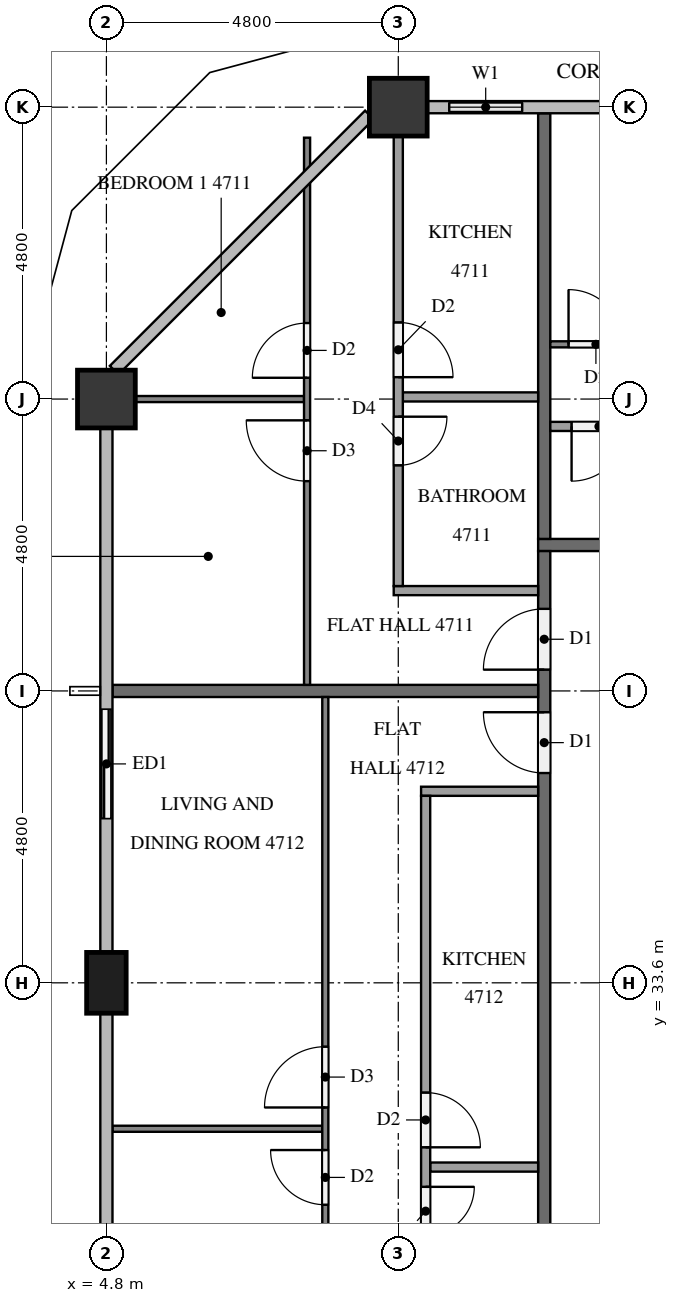
"""IFC4 building model, lengths in metres.
Left out: names, types, materials, properties, quantities, classifications, styles, units other than length and angle.
Written with IfcOpenShell. Run it as: python <this file> out.ifc"""

import sys

from ifc_helpers import new_model, si_unit, direction, frame, frame_2d, origin, origin_2d, place, context, subcontext, project, spatial, rectangle, extrude, element, fill, save


model = new_model("IFC4")
c1 = context("Model", 3, precision=1e-05, world=origin(), true_north=direction((0.0, 1.0)))
c2 = subcontext(c1, "Body", "Model", "MODEL_VIEW")
j1 = project(units=[si_unit("LENGTHUNIT", "METRE"), si_unit("PLANEANGLEUNIT", "RADIAN")], contexts=[c1])
p1 = place(None, origin())
s1 = spatial("IfcSite", under=j1, at=p1, CompositionType="ELEMENT")
p2 = place(p1, origin())
s2 = spatial("IfcBuilding", under=s1, at=p2, CompositionType="ELEMENT")
p3 = place(p2, frame((0.0, 0.0, 182.4)))
s3 = spatial("IfcBuildingStorey", under=s2, at=p3, CompositionType="ELEMENT", Elevation=182.4)
for number, where, z_axis, x_axis in (
    (1, (9.6, 48.0, 0.0), (0.0, 0.0, 1.0), (1.0, 0.0, 0.0)),
    (2, (4.8, 43.2, 0.0), (0.0, 0.0, 1.0), (1.0, 0.0, 0.0)),
):
    element("IfcColumn", number, at=place(p3, frame(where, z_axis=z_axis, x_axis=x_axis)), inside=s3, PredefinedType="COLUMN", context=c2, shape_type="SweptSolid", body=[
        extrude(rectangle(XDim=0.95, YDim=0.95, at=origin_2d()), origin(), (0.0, 0.0, 1.0), 3.2),
    ])
p4 = place(p3, frame((4.8, 33.6, 0.0), z_axis=(0.0, 0.0, 1.0), x_axis=(0.0, 1.0, 0.0)))
e3 = element("IfcColumn", 3, at=p4, inside=s3, PredefinedType="COLUMN", context=c2, shape_type="SweptSolid", body=[
    extrude(rectangle(XDim=1.0, YDim=0.65, at=origin_2d()), origin(), (0.0, 0.0, 1.0), 3.2),
])
p5 = place(p3, frame((12.0, 48.0, 0.0), z_axis=(0.0, 0.0, 1.0), x_axis=(-1.0, 0.0, 0.0)))
e4 = element("IfcWall", 4, at=p5, inside=s3, PredefinedType="SOLIDWALL", context=c2, shape_type="SweptSolid", body=[
    extrude(rectangle(XDim=1.925, YDim=0.15, at=frame_2d((0.962, 0.0))), origin(), (0.0, 0.0, 1.0), 3.2),
])
p6 = place(p5, frame((0.363, 0.0, 0.9)))
e5 = element("IfcOpeningElement", 5, at=p6, cuts=e4, PredefinedType="OPENING", context=c2, shape_type="SweptSolid", body=[
    extrude(rectangle(XDim=1.2, YDim=1.4, at=frame_2d((0.6, 0.7))), frame((0.0, 0.085, 0.0), z_axis=(0.0, -1.0, 0.0), x_axis=(1.0, 0.0, 0.0)), (0.0, 0.0, 1.0), 0.17),
])
p7 = place(p3, frame((4.8, 38.4, 0.0), z_axis=(0.0, 0.0, 1.0), x_axis=(0.0, -1.0, 0.0)))
e6 = element("IfcWall", 6, at=p7, inside=s3, PredefinedType="SOLIDWALL", context=c2, shape_type="SweptSolid", body=[
    extrude(rectangle(XDim=2.4, YDim=0.15, at=frame_2d((1.2, 0.0))), origin(), (0.0, 0.0, 1.0), 3.2),
])
p8 = place(p7, frame((0.3, 0.0, 0.0)))
e7 = element("IfcOpeningElement", 7, at=p8, cuts=e6, PredefinedType="OPENING", context=c2, shape_type="SweptSolid", body=[
    extrude(rectangle(XDim=1.8, YDim=2.4, at=frame_2d((0.9, 1.2))), frame((0.0, 0.085, 0.0), z_axis=(0.0, -1.0, 0.0), x_axis=(1.0, 0.0, 0.0)), (0.0, 0.0, 1.0), 0.17),
])
p9 = place(p3, frame((11.9, 40.8, 0.0), z_axis=(0.0, 0.0, 1.0), x_axis=(1.0, 0.0, 0.0)))
e8 = element("IfcWall", 8, at=p9, inside=s3, PredefinedType="PARTITIONING", context=c2, shape_type="SweptSolid", body=[
    extrude(rectangle(XDim=38.6, YDim=0.2, at=frame_2d((19.3, 0.0))), origin(), (0.0, 0.0, 1.0), 3.2),
])
p10 = place(p9, frame((37.15, 0.0, 0.0)))
e9 = element("IfcOpeningElement", 9, at=p10, cuts=e8, PredefinedType="OPENING", context=c2, shape_type="SweptSolid", body=[
    extrude(rectangle(XDim=1.0, YDim=2.1, at=frame_2d((0.5, 1.05))), frame((0.0, 0.11, 0.0), z_axis=(0.0, -1.0, 0.0), x_axis=(1.0, 0.0, 0.0)), (0.0, 0.0, 1.0), 0.22),
])
p11 = place(p9, frame((20.35, 0.0, 0.0)))
e10 = element("IfcOpeningElement", 10, at=p11, cuts=e8, PredefinedType="OPENING", context=c2, shape_type="SweptSolid", body=[
    extrude(rectangle(XDim=1.0, YDim=2.1, at=frame_2d((0.5, 1.05))), frame((0.0, 0.11, 0.0), z_axis=(0.0, -1.0, 0.0), x_axis=(1.0, 0.0, 0.0)), (0.0, 0.0, 1.0), 0.22),
])
p12 = place(p9, frame((13.15, 0.0, 0.0)))
e11 = element("IfcOpeningElement", 11, at=p12, cuts=e8, PredefinedType="OPENING", context=c2, shape_type="SweptSolid", body=[
    extrude(rectangle(XDim=1.0, YDim=2.1, at=frame_2d((0.5, 1.05))), frame((0.0, 0.11, 0.0), z_axis=(0.0, -1.0, 0.0), x_axis=(1.0, 0.0, 0.0)), (0.0, 0.0, 1.0), 0.22),
])
p13 = place(p3, frame((12.0, 12.1, 0.0), z_axis=(0.0, 0.0, 1.0), x_axis=(0.0, 1.0, 0.0)))
e12 = element("IfcWall", 12, at=p13, inside=s3, PredefinedType="PARTITIONING", context=c2, shape_type="SweptSolid", body=[
    extrude(rectangle(XDim=28.6, YDim=0.2, at=frame_2d((14.3, 0.0))), origin(), (0.0, 0.0, 1.0), 3.2),
])
p14 = place(p13, frame((26.65, 0.0, 0.0)))
e13 = element("IfcOpeningElement", 13, at=p14, cuts=e12, PredefinedType="OPENING", context=c2, shape_type="SweptSolid", body=[
    extrude(rectangle(XDim=1.0, YDim=2.1, at=frame_2d((0.5, 1.05))), frame((0.0, 0.11, 0.0), z_axis=(0.0, -1.0, 0.0), x_axis=(1.0, 0.0, 0.0)), (0.0, 0.0, 1.0), 0.22),
])
p15 = place(p13, frame((24.95, 0.0, 0.0)))
e14 = element("IfcOpeningElement", 14, at=p15, cuts=e12, PredefinedType="OPENING", context=c2, shape_type="SweptSolid", body=[
    extrude(rectangle(XDim=1.0, YDim=2.1, at=frame_2d((0.5, 1.05))), frame((0.0, 0.11, 0.0), z_axis=(0.0, -1.0, 0.0), x_axis=(1.0, 0.0, 0.0)), (0.0, 0.0, 1.0), 0.22),
])
p16 = place(p13, frame((12.95, 0.0, 0.0)))
e15 = element("IfcOpeningElement", 15, at=p16, cuts=e12, PredefinedType="OPENING", context=c2, shape_type="SweptSolid", body=[
    extrude(rectangle(XDim=1.0, YDim=2.1, at=frame_2d((0.5, 1.05))), frame((0.0, 0.11, 0.0), z_axis=(0.0, -1.0, 0.0), x_axis=(1.0, 0.0, 0.0)), (0.0, 0.0, 1.0), 0.22),
])
for number, where, z_axis, x_axis in (
    (16, (12.0, 47.9, 0.0), (0.0, 0.0, 1.0), (0.0, -1.0, 0.0)),
    (17, (4.9, 38.4, 0.0), (0.0, 0.0, 1.0), (1.0, 0.0, 0.0)),
):
    element("IfcWall", number, at=place(p3, frame(where, z_axis=z_axis, x_axis=x_axis)), inside=s3, PredefinedType="PARTITIONING", context=c2, shape_type="SweptSolid", body=[
        extrude(rectangle(XDim=7.0, YDim=0.2, at=frame_2d((3.5, 0.0))), origin(), (0.0, 0.0, 1.0), 3.2),
    ])
p17 = place(p3, frame((12.1, 44.1, 0.0), z_axis=(0.0, 0.0, 1.0), x_axis=(1.0, 0.0, 0.0)))
e18 = element("IfcWall", 18, at=p17, inside=s3, PredefinedType="PARTITIONING", context=c2, shape_type="SweptSolid", body=[
    extrude(rectangle(XDim=14.2, YDim=0.1, at=frame_2d((7.1, 0.0))), origin(), (0.0, 0.0, 1.0), 3.2),
])
p18 = place(p17, frame((9.85, 0.0, 0.0)))
e19 = element("IfcOpeningElement", 19, at=p18, cuts=e18, PredefinedType="OPENING", context=c2, shape_type="SweptSolid", body=[
    extrude(rectangle(XDim=0.9, YDim=2.1, at=frame_2d((0.45, 1.05))), frame((0.0, 0.06, 0.0), z_axis=(0.0, -1.0, 0.0), x_axis=(1.0, 0.0, 0.0)), (0.0, 0.0, 1.0), 0.12),
])
p19 = place(p17, frame((8.15, 0.0, 0.0)))
e20 = element("IfcOpeningElement", 20, at=p19, cuts=e18, PredefinedType="OPENING", context=c2, shape_type="SweptSolid", body=[
    extrude(rectangle(XDim=1.0, YDim=2.1, at=frame_2d((0.5, 1.05))), frame((0.0, 0.06, 0.0), z_axis=(0.0, -1.0, 0.0), x_axis=(1.0, 0.0, 0.0)), (0.0, 0.0, 1.0), 0.12),
])
p20 = place(p17, frame((0.3, 0.0, 0.0)))
e21 = element("IfcOpeningElement", 21, at=p20, cuts=e18, PredefinedType="OPENING", context=c2, shape_type="SweptSolid", body=[
    extrude(rectangle(XDim=0.9, YDim=2.1, at=frame_2d((0.45, 1.05))), frame((0.0, 0.06, 0.0), z_axis=(0.0, -1.0, 0.0), x_axis=(1.0, 0.0, 0.0)), (0.0, 0.0, 1.0), 0.12),
])
p21 = place(p3, frame((24.675, 42.75, 0.0), z_axis=(0.0, 0.0, 1.0), x_axis=(-1.0, 0.0, 0.0)))
e22 = element("IfcWall", 22, at=p21, inside=s3, PredefinedType="PARTITIONING", context=c2, shape_type="SweptSolid", body=[
    extrude(rectangle(XDim=12.575, YDim=0.15, at=frame_2d((6.288, 0.0))), origin(), (0.0, 0.0, 1.0), 3.2),
])
p22 = place(p21, frame((1.777, 0.0, 0.0)))
e23 = element("IfcOpeningElement", 23, at=p22, cuts=e22, PredefinedType="OPENING", context=c2, shape_type="SweptSolid", body=[
    extrude(rectangle(XDim=0.8, YDim=2.1, at=frame_2d((0.4, 1.05))), frame((0.0, 0.085, 0.0), z_axis=(0.0, -1.0, 0.0), x_axis=(1.0, 0.0, 0.0)), (0.0, 0.0, 1.0), 0.17),
])
p23 = place(p21, frame((3.227, 0.0, 0.0)))
e24 = element("IfcOpeningElement", 24, at=p23, cuts=e22, PredefinedType="OPENING", context=c2, shape_type="SweptSolid", body=[
    extrude(rectangle(XDim=0.9, YDim=2.1, at=frame_2d((0.45, 1.05))), frame((0.0, 0.085, 0.0), z_axis=(0.0, -1.0, 0.0), x_axis=(1.0, 0.0, 0.0)), (0.0, 0.0, 1.0), 0.17),
])
p24 = place(p21, frame((11.325, 0.0, 0.0)))
e25 = element("IfcOpeningElement", 25, at=p24, cuts=e22, PredefinedType="OPENING", context=c2, shape_type="SweptSolid", body=[
    extrude(rectangle(XDim=0.9, YDim=2.1, at=frame_2d((0.45, 1.05))), frame((0.0, 0.085, 0.0), z_axis=(0.0, -1.0, 0.0), x_axis=(1.0, 0.0, 0.0)), (0.0, 0.0, 1.0), 0.17),
])
p25 = place(p3, frame((8.05, 43.2, 0.0), z_axis=(0.0, 0.0, 1.0), x_axis=(-1.0, 0.0, 0.0)))
e26 = element("IfcWall", 26, at=p25, inside=s3, PredefinedType="PARTITIONING", context=c2, shape_type="SweptSolid", body=[
    extrude(rectangle(XDim=2.775, YDim=0.1, at=frame_2d((1.388, 0.0))), origin(), (0.0, 0.0, 1.0), 3.2),
])
p26 = place(p3, frame((8.1, 38.5, 0.0), z_axis=(0.0, 0.0, 1.0), x_axis=(0.0, 1.0, 0.0)))
e27 = element("IfcWall", 27, at=p26, inside=s3, PredefinedType="PARTITIONING", context=c2, shape_type="SweptSolid", body=[
    extrude(rectangle(XDim=8.998, YDim=0.1, at=frame_2d((4.499, 0.0))), origin(), (0.0, 0.0, 1.0), 3.2),
])
p27 = place(p26, frame((3.35, 0.0, 0.0)))
e28 = element("IfcOpeningElement", 28, at=p27, cuts=e27, PredefinedType="OPENING", context=c2, shape_type="SweptSolid", body=[
    extrude(rectangle(XDim=1.0, YDim=2.1, at=frame_2d((0.5, 1.05))), frame((0.0, 0.06, 0.0), z_axis=(0.0, -1.0, 0.0), x_axis=(1.0, 0.0, 0.0)), (0.0, 0.0, 1.0), 0.12),
])
p28 = place(p26, frame((5.05, 0.0, 0.0)))
e29 = element("IfcOpeningElement", 29, at=p28, cuts=e27, PredefinedType="OPENING", context=c2, shape_type="SweptSolid", body=[
    extrude(rectangle(XDim=0.9, YDim=2.1, at=frame_2d((0.45, 1.05))), frame((0.0, 0.06, 0.0), z_axis=(0.0, -1.0, 0.0), x_axis=(1.0, 0.0, 0.0)), (0.0, 0.0, 1.0), 0.12),
])
p29 = place(p3, frame((11.9, 43.235, 0.0), z_axis=(0.0, 0.0, 1.0), x_axis=(-1.0, 0.0, 0.0)))
e30 = element("IfcWall", 30, at=p29, inside=s3, PredefinedType="PARTITIONING", context=c2, shape_type="SweptSolid", body=[
    extrude(rectangle(XDim=2.225, YDim=0.15, at=frame_2d((1.112, 0.0))), origin(), (0.0, 0.0, 1.0), 3.2),
])
p30 = place(p3, frame((11.9, 40.05, 0.0), z_axis=(0.0, 0.0, 1.0), x_axis=(-1.0, 0.0, 0.0)))
e31 = element("IfcWall", 31, at=p30, inside=s3, PredefinedType="PARTITIONING", context=c2, shape_type="SweptSolid", body=[
    extrude(rectangle(XDim=2.375, YDim=0.15, at=frame_2d((1.188, 0.0))), origin(), (0.0, 0.0, 1.0), 3.2),
])
p31 = place(p3, frame((9.6, 47.525, 0.0), z_axis=(0.0, 0.0, 1.0), x_axis=(0.0, -1.0, 0.0)))
e32 = element("IfcWall", 32, at=p31, inside=s3, PredefinedType="PARTITIONING", context=c2, shape_type="SweptSolid", body=[
    extrude(rectangle(XDim=7.4, YDim=0.15, at=frame_2d((3.7, 0.0))), origin(), (0.0, 0.0, 1.0), 3.2),
])
p32 = place(p31, frame((4.615, 0.0, 0.0)))
e33 = element("IfcOpeningElement", 33, at=p32, cuts=e32, PredefinedType="OPENING", context=c2, shape_type="SweptSolid", body=[
    extrude(rectangle(XDim=0.8, YDim=2.1, at=frame_2d((0.4, 1.05))), frame((0.0, 0.085, 0.0), z_axis=(0.0, -1.0, 0.0), x_axis=(1.0, 0.0, 0.0)), (0.0, 0.0, 1.0), 0.17),
])
p33 = place(p31, frame((3.065, 0.0, 0.0)))
e34 = element("IfcOpeningElement", 34, at=p33, cuts=e32, PredefinedType="OPENING", context=c2, shape_type="SweptSolid", body=[
    extrude(rectangle(XDim=0.9, YDim=2.1, at=frame_2d((0.45, 1.05))), frame((0.0, 0.085, 0.0), z_axis=(0.0, -1.0, 0.0), x_axis=(1.0, 0.0, 0.0)), (0.0, 0.0, 1.0), 0.17),
])
p34 = place(p3, frame((8.35, 31.2, 0.0), z_axis=(0.0, 0.0, 1.0), x_axis=(-1.0, 0.0, 0.0)))
e35 = element("IfcWall", 35, at=p34, inside=s3, PredefinedType="PARTITIONING", context=c2, shape_type="SweptSolid", body=[
    extrude(rectangle(XDim=3.45, YDim=0.1, at=frame_2d((1.725, 0.0))), origin(), (0.0, 0.0, 1.0), 3.2),
])
p35 = place(p3, frame((8.4, 26.5, 0.0), z_axis=(0.0, 0.0, 1.0), x_axis=(0.0, 1.0, 0.0)))
e36 = element("IfcWall", 36, at=p35, inside=s3, PredefinedType="PARTITIONING", context=c2, shape_type="SweptSolid", body=[
    extrude(rectangle(XDim=11.8, YDim=0.1, at=frame_2d((5.9, 0.0))), origin(), (0.0, 0.0, 1.0), 3.2),
])
p36 = place(p35, frame((5.05, 0.0, 0.0)))
e37 = element("IfcOpeningElement", 37, at=p36, cuts=e36, PredefinedType="OPENING", context=c2, shape_type="SweptSolid", body=[
    extrude(rectangle(XDim=1.0, YDim=2.1, at=frame_2d((0.5, 1.05))), frame((0.0, 0.06, 0.0), z_axis=(0.0, -1.0, 0.0), x_axis=(1.0, 0.0, 0.0)), (0.0, 0.0, 1.0), 0.12),
])
p37 = place(p35, frame((3.45, 0.0, 0.0)))
e38 = element("IfcOpeningElement", 38, at=p37, cuts=e36, PredefinedType="OPENING", context=c2, shape_type="SweptSolid", body=[
    extrude(rectangle(XDim=0.9, YDim=2.1, at=frame_2d((0.45, 1.05))), frame((0.0, 0.06, 0.0), z_axis=(0.0, -1.0, 0.0), x_axis=(1.0, 0.0, 0.0)), (0.0, 0.0, 1.0), 0.12),
])
p38 = place(p3, frame((11.9, 30.57, 0.0), z_axis=(0.0, 0.0, 1.0), x_axis=(-1.0, 0.0, 0.0)))
e39 = element("IfcWall", 39, at=p38, inside=s3, PredefinedType="PARTITIONING", context=c2, shape_type="SweptSolid", body=[
    extrude(rectangle(XDim=1.775, YDim=0.15, at=frame_2d((0.887, 0.0))), origin(), (0.0, 0.0, 1.0), 3.2),
])
p39 = place(p3, frame((11.9, 36.75, 0.0), z_axis=(0.0, 0.0, 1.0), x_axis=(-1.0, 0.0, 0.0)))
e40 = element("IfcWall", 40, at=p39, inside=s3, PredefinedType="PARTITIONING", context=c2, shape_type="SweptSolid", body=[
    extrude(rectangle(XDim=1.925, YDim=0.15, at=frame_2d((0.962, 0.0))), origin(), (0.0, 0.0, 1.0), 3.2),
])
p40 = place(p3, frame((10.05, 36.675, 0.0), z_axis=(0.0, 0.0, 1.0), x_axis=(0.0, -1.0, 0.0)))
e41 = element("IfcWall", 41, at=p40, inside=s3, PredefinedType="PARTITIONING", context=c2, shape_type="SweptSolid", body=[
    extrude(rectangle(XDim=10.175, YDim=0.15, at=frame_2d((5.087, 0.0))), origin(), (0.0, 0.0, 1.0), 3.2),
])
p41 = place(p40, frame((4.88, 0.0, 0.0)))
e42 = element("IfcOpeningElement", 42, at=p41, cuts=e41, PredefinedType="OPENING", context=c2, shape_type="SweptSolid", body=[
    extrude(rectangle(XDim=0.9, YDim=2.1, at=frame_2d((0.45, 1.05))), frame((0.0, 0.085, 0.0), z_axis=(0.0, -1.0, 0.0), x_axis=(1.0, 0.0, 0.0)), (0.0, 0.0, 1.0), 0.17),
])
p42 = place(p40, frame((6.43, 0.0, 0.0)))
e43 = element("IfcOpeningElement", 43, at=p42, cuts=e41, PredefinedType="OPENING", context=c2, shape_type="SweptSolid", body=[
    extrude(rectangle(XDim=0.8, YDim=2.1, at=frame_2d((0.4, 1.05))), frame((0.0, 0.085, 0.0), z_axis=(0.0, -1.0, 0.0), x_axis=(1.0, 0.0, 0.0)), (0.0, 0.0, 1.0), 0.17),
])
p43 = place(p6, origin())
e44 = element("IfcWindow", 44, at=p43, inside=s3, PartitioningType="SINGLE_PANEL", PredefinedType="WINDOW", context=c2, shape_type="SweptSolid", body=[
    extrude(rectangle(XDim=1.2, YDim=1.4, at=frame_2d((0.6, 0.7))), frame((0.0, 0.03, 0.0), z_axis=(0.0, -1.0, 0.0), x_axis=(1.0, 0.0, 0.0)), (0.0, 0.0, 1.0), 0.06),
])
fill(e5, e44)
p44 = place(p8, origin())
e45 = element("IfcDoor", 45, at=p44, inside=s3, OperationType="SLIDING_TO_RIGHT", PredefinedType="DOOR", context=c2, shape_type="SweptSolid", body=[
    extrude(rectangle(XDim=1.8, YDim=2.4, at=frame_2d((0.9, 1.2))), frame((0.0, 0.025, 0.0), z_axis=(0.0, -1.0, 0.0), x_axis=(1.0, 0.0, 0.0)), (0.0, 0.0, 1.0), 0.05),
])
fill(e7, e45)
p45 = place(p14, origin())
e46 = element("IfcDoor", 46, at=p45, inside=s3, OperationType="SINGLE_SWING_LEFT", PredefinedType="DOOR", context=c2, shape_type="SweptSolid", body=[
    extrude(rectangle(XDim=1.0, YDim=2.1, at=frame_2d((0.5, 1.05))), frame((0.0, 0.025, 0.0), z_axis=(0.0, -1.0, 0.0), x_axis=(1.0, 0.0, 0.0)), (0.0, 0.0, 1.0), 0.05),
])
fill(e13, e46)
p46 = place(p15, origin())
e47 = element("IfcDoor", 47, at=p46, inside=s3, OperationType="SINGLE_SWING_RIGHT", PredefinedType="DOOR", context=c2, shape_type="SweptSolid", body=[
    extrude(rectangle(XDim=1.0, YDim=2.1, at=frame_2d((0.5, 1.05))), frame((0.0, 0.025, 0.0), z_axis=(0.0, -1.0, 0.0), x_axis=(1.0, 0.0, 0.0)), (0.0, 0.0, 1.0), 0.05),
])
fill(e14, e47)
p47 = place(p20, origin())
e48 = element("IfcDoor", 48, at=p47, inside=s3, OperationType="SINGLE_SWING_LEFT", PredefinedType="DOOR", context=c2, shape_type="SweptSolid", body=[
    extrude(rectangle(XDim=0.9, YDim=2.1, at=frame_2d((0.45, 1.05))), frame((0.0, 0.025, 0.0), z_axis=(0.0, -1.0, 0.0), x_axis=(1.0, 0.0, 0.0)), (0.0, 0.0, 1.0), 0.05),
])
fill(e21, e48)
p48 = place(p24, origin())
e49 = element("IfcDoor", 49, at=p48, inside=s3, OperationType="SINGLE_SWING_RIGHT", PredefinedType="DOOR", context=c2, shape_type="SweptSolid", body=[
    extrude(rectangle(XDim=0.9, YDim=2.1, at=frame_2d((0.45, 1.05))), frame((0.0, 0.025, 0.0), z_axis=(0.0, -1.0, 0.0), x_axis=(1.0, 0.0, 0.0)), (0.0, 0.0, 1.0), 0.05),
])
fill(e25, e49)
p49 = place(p27, origin())
e50 = element("IfcDoor", 50, at=p49, inside=s3, OperationType="SINGLE_SWING_RIGHT", PredefinedType="DOOR", context=c2, shape_type="SweptSolid", body=[
    extrude(rectangle(XDim=1.0, YDim=2.1, at=frame_2d((0.5, 1.05))), frame((0.0, 0.025, 0.0), z_axis=(0.0, -1.0, 0.0), x_axis=(1.0, 0.0, 0.0)), (0.0, 0.0, 1.0), 0.05),
])
fill(e28, e50)
p50 = place(p28, origin())
e51 = element("IfcDoor", 51, at=p50, inside=s3, OperationType="SINGLE_SWING_LEFT", PredefinedType="DOOR", context=c2, shape_type="SweptSolid", body=[
    extrude(rectangle(XDim=0.9, YDim=2.1, at=frame_2d((0.45, 1.05))), frame((0.0, 0.025, 0.0), z_axis=(0.0, -1.0, 0.0), x_axis=(1.0, 0.0, 0.0)), (0.0, 0.0, 1.0), 0.05),
])
fill(e29, e51)
p51 = place(p32, origin())
e52 = element("IfcDoor", 52, at=p51, inside=s3, OperationType="SINGLE_SWING_LEFT", PredefinedType="DOOR", context=c2, shape_type="SweptSolid", body=[
    extrude(rectangle(XDim=0.8, YDim=2.1, at=frame_2d((0.4, 1.05))), frame((0.0, 0.025, 0.0), z_axis=(0.0, -1.0, 0.0), x_axis=(1.0, 0.0, 0.0)), (0.0, 0.0, 1.0), 0.05),
])
fill(e33, e52)
p52 = place(p33, origin())
e53 = element("IfcDoor", 53, at=p52, inside=s3, OperationType="SINGLE_SWING_RIGHT", PredefinedType="DOOR", context=c2, shape_type="SweptSolid", body=[
    extrude(rectangle(XDim=0.9, YDim=2.1, at=frame_2d((0.45, 1.05))), frame((0.0, 0.025, 0.0), z_axis=(0.0, -1.0, 0.0), x_axis=(1.0, 0.0, 0.0)), (0.0, 0.0, 1.0), 0.05),
])
fill(e34, e53)
p53 = place(p36, origin())
e54 = element("IfcDoor", 54, at=p53, inside=s3, OperationType="SINGLE_SWING_LEFT", PredefinedType="DOOR", context=c2, shape_type="SweptSolid", body=[
    extrude(rectangle(XDim=1.0, YDim=2.1, at=frame_2d((0.5, 1.05))), frame((0.0, 0.025, 0.0), z_axis=(0.0, -1.0, 0.0), x_axis=(1.0, 0.0, 0.0)), (0.0, 0.0, 1.0), 0.05),
])
fill(e37, e54)
p54 = place(p37, origin())
e55 = element("IfcDoor", 55, at=p54, inside=s3, OperationType="SINGLE_SWING_RIGHT", PredefinedType="DOOR", context=c2, shape_type="SweptSolid", body=[
    extrude(rectangle(XDim=0.9, YDim=2.1, at=frame_2d((0.45, 1.05))), frame((0.0, 0.025, 0.0), z_axis=(0.0, -1.0, 0.0), x_axis=(1.0, 0.0, 0.0)), (0.0, 0.0, 1.0), 0.05),
])
fill(e38, e55)
p55 = place(p41, origin())
e56 = element("IfcDoor", 56, at=p55, inside=s3, OperationType="SINGLE_SWING_RIGHT", PredefinedType="DOOR", context=c2, shape_type="SweptSolid", body=[
    extrude(rectangle(XDim=0.9, YDim=2.1, at=frame_2d((0.45, 1.05))), frame((0.0, 0.025, 0.0), z_axis=(0.0, -1.0, 0.0), x_axis=(1.0, 0.0, 0.0)), (0.0, 0.0, 1.0), 0.05),
])
fill(e42, e56)
p56 = place(p42, origin())
e57 = element("IfcDoor", 57, at=p56, inside=s3, OperationType="SINGLE_SWING_LEFT", PredefinedType="DOOR", context=c2, shape_type="SweptSolid", body=[
    extrude(rectangle(XDim=0.8, YDim=2.1, at=frame_2d((0.4, 1.05))), frame((0.0, 0.025, 0.0), z_axis=(0.0, -1.0, 0.0), x_axis=(1.0, 0.0, 0.0)), (0.0, 0.0, 1.0), 0.05),
])
fill(e43, e57)
save(model, sys.argv[1])
